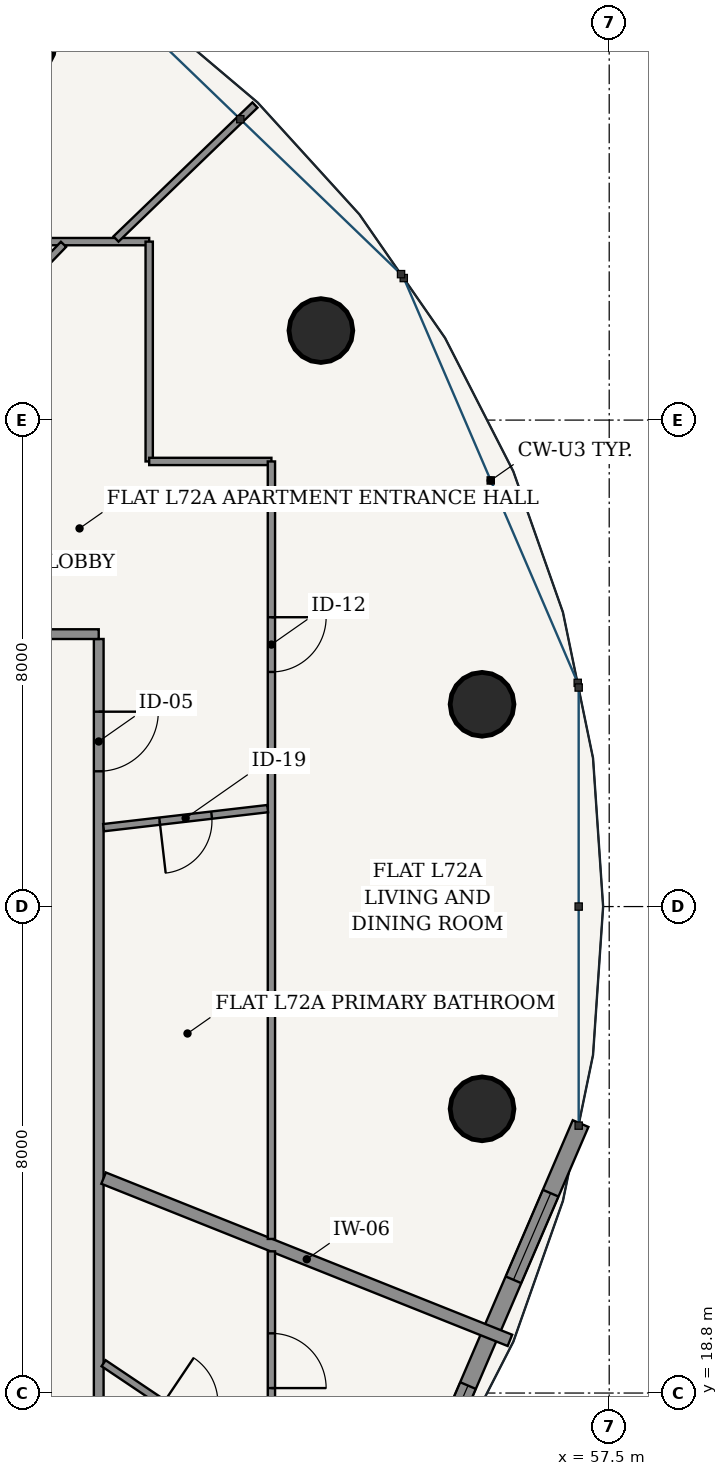
"""IFC4 building model, lengths in metres.
Left out: names, types, materials, properties, quantities, classifications, styles, units other than length and angle.
Written with IfcOpenShell. Run it as: python <this file> out.ifc"""

import sys

from ifc_helpers import new_model, si_unit, direction, frame, frame_2d, origin, origin_2d, place, context, subcontext, project, spatial, rectangle, hollow_circle, extrude, source, transform, mapped, element, fill, save


model = new_model("IFC4")
c1 = context("Model", 3, precision=1e-05, world=origin(), true_north=direction((-0.2419218956, 0.970295726276)))
c2 = subcontext(c1, "Body", "Model", "MODEL_VIEW")
j1 = project(units=[si_unit("LENGTHUNIT", "METRE"), si_unit("PLANEANGLEUNIT", "RADIAN")], contexts=[c1])
p1 = place(None, origin())
s1 = spatial("IfcSite", under=j1, at=p1, CompositionType="ELEMENT")
p2 = place(p1, origin())
s2 = spatial("IfcBuilding", under=s1, at=p2, CompositionType="ELEMENT")
p3 = place(p2, frame((0.0, 0.0, 274.45)))
s3 = spatial("IfcBuildingStorey", under=s2, at=p3, CompositionType="ELEMENT", Elevation=274.45)
for number, where, z_axis, x_axis in (
    (1, (55.409, 30.126, 0.0), (0.0, 0.0, 1.0), (1.0, 0.0, 0.0)),
    (2, (52.759, 36.272, 0.0), (0.0, 0.0, 1.0), (1.0, 0.0, 0.0)),
    (3, (47.861, 40.977, 0.0), (0.0, 0.0, 1.0), (1.0, 0.0, 0.0)),
    (4, (55.409, 23.474, 0.0), (0.0, 0.0, 1.0), (1.0, 0.0, 0.0)),
):
    element("IfcColumn", number, at=place(p3, frame(where, z_axis=z_axis, x_axis=x_axis)), inside=s3, PredefinedType="COLUMN", context=c2, shape_type="SweptSolid", body=[
        extrude(hollow_circle(Radius=0.525, WallThickness=0.035, at=origin_2d()), origin(), (0.0, 0.0, 1.0), 3.75),
    ])
p4 = place(p3, frame((54.074, 16.354, 0.0), z_axis=(0.0, 0.0, 1.0), x_axis=(0.394816612978, 0.918759948037, 0.0)))
e5 = element("IfcWall", 5, at=p4, inside=s3, PredefinedType="SOLIDWALL", context=c2, shape_type="SweptSolid", body=[
    extrude(rectangle(XDim=7.485, YDim=0.28, at=frame_2d((3.743, 0.0))), origin(), (0.0, 0.0, 1.0), 3.49),
])
p5 = place(p4, frame((1.246, 0.0, 0.85)))
e6 = element("IfcOpeningElement", 6, at=p5, cuts=e5, PredefinedType="OPENING", context=c2, shape_type="SweptSolid", body=[
    extrude(rectangle(XDim=1.55, YDim=1.95, at=frame_2d((0.775, 0.975))), frame((0.0, 0.15, 0.0), z_axis=(0.0, -1.0, 0.0), x_axis=(1.0, 0.0, 0.0)), (0.0, 0.0, 1.0), 0.3),
])
p6 = place(p4, frame((4.689, 0.0, 0.85)))
e7 = element("IfcOpeningElement", 7, at=p6, cuts=e5, PredefinedType="OPENING", context=c2, shape_type="SweptSolid", body=[
    extrude(rectangle(XDim=1.55, YDim=1.95, at=frame_2d((0.775, 0.975))), frame((0.0, 0.15, 0.0), z_axis=(0.0, -1.0, 0.0), x_axis=(1.0, 0.0, 0.0)), (0.0, 0.0, 1.0), 0.3),
])
p7 = place(p3, frame((49.105, 17.275, 0.0), z_axis=(0.0, 0.0, 1.0), x_axis=(0.0, 1.0, 0.0)))
e8 = element("IfcWall", 8, at=p7, inside=s3, PredefinedType="PARTITIONING", context=c2, shape_type="SweptSolid", body=[
    extrude(rectangle(XDim=13.925, YDim=0.16, at=frame_2d((6.962, 0.0))), origin(), (0.0, 0.0, 1.0), 3.015),
])
p8 = place(p7, frame((11.75, 0.0, 0.0)))
e9 = element("IfcOpeningElement", 9, at=p8, cuts=e8, PredefinedType="OPENING", context=c2, shape_type="SweptSolid", body=[
    extrude(rectangle(XDim=0.98, YDim=2.2, at=frame_2d((0.49, 1.1))), frame((0.0, 0.09, 0.0), z_axis=(0.0, -1.0, 0.0), x_axis=(1.0, 0.0, 0.0)), (0.0, 0.0, 1.0), 0.18),
])
p9 = place(p3, frame((47.175, 31.28, 0.0), z_axis=(0.0, 0.0, 1.0), x_axis=(1.0, 0.0, 0.0)))
e10 = element("IfcWall", 10, at=p9, inside=s3, PredefinedType="PARTITIONING", context=c2, shape_type="SweptSolid", body=[
    extrude(rectangle(XDim=1.93, YDim=0.16, at=frame_2d((0.965, 0.0))), origin(), (0.0, 0.0, 1.0), 3.49),
])
p10 = place(p3, frame((49.185, 22.334, 0.0), z_axis=(0.0, 0.0, 1.0), x_axis=(0.928710518269, -0.370805573389, 0.0)))
e11 = element("IfcWall", 11, at=p10, inside=s3, PredefinedType="PARTITIONING", context=c2, shape_type="SweptSolid", body=[
    extrude(rectangle(XDim=7.195, YDim=0.2, at=frame_2d((3.598, 0.0))), origin(), (0.0, 0.0, 1.0), 3.121),
])
p11 = place(p3, frame((26.065, 37.735, 0.0), z_axis=(0.0, 0.0, 1.0), x_axis=(1.0, 0.0, 0.0)))
e12 = element("IfcWall", 12, at=p11, inside=s3, PredefinedType="PARTITIONING", context=c2, shape_type="SweptSolid", body=[
    extrude(rectangle(XDim=23.87, YDim=0.12, at=frame_2d((11.935, 0.0))), origin(), (0.0, 0.0, 1.0), 3.015),
])
p12 = place(p11, frame((18.46, 0.0, 0.0)))
e13 = element("IfcOpeningElement", 13, at=p12, cuts=e12, PredefinedType="OPENING", context=c2, shape_type="SweptSolid", body=[
    extrude(rectangle(XDim=0.9, YDim=2.15, at=frame_2d((0.45, 1.075))), frame((0.0, 0.07, 0.0), z_axis=(0.0, -1.0, 0.0), x_axis=(1.0, 0.0, 0.0)), (0.0, 0.0, 1.0), 0.14),
])
p13 = place(p11, frame((3.144, 0.0, 0.0)))
e14 = element("IfcOpeningElement", 14, at=p13, cuts=e12, PredefinedType="OPENING", context=c2, shape_type="SweptSolid", body=[
    extrude(rectangle(XDim=0.9, YDim=2.15, at=frame_2d((0.45, 1.075))), frame((0.0, 0.07, 0.0), z_axis=(0.0, -1.0, 0.0), x_axis=(1.0, 0.0, 0.0)), (0.0, 0.0, 1.0), 0.14),
])
p14 = place(p3, frame((49.935, 37.735, 0.0), z_axis=(0.0, 0.0, 1.0), x_axis=(0.0, -1.0, 0.0)))
e15 = element("IfcWall", 15, at=p14, inside=s3, PredefinedType="PARTITIONING", context=c2, shape_type="SweptSolid", body=[
    extrude(rectangle(XDim=3.615, YDim=0.12, at=frame_2d((1.808, 0.0))), origin(), (0.0, 0.0, 1.0), 3.015),
])
p15 = place(p3, frame((49.935, 34.12, 0.0), z_axis=(0.0, 0.0, 1.0), x_axis=(1.0, 0.0, 0.0)))
e16 = element("IfcWall", 16, at=p15, inside=s3, PredefinedType="PARTITIONING", context=c2, shape_type="SweptSolid", body=[
    extrude(rectangle(XDim=2.01, YDim=0.12, at=frame_2d((1.005, 0.0))), origin(), (0.0, 0.0, 1.0), 3.209),
])
p16 = place(p3, frame((51.945, 34.12, 0.0), z_axis=(0.0, 0.0, 1.0), x_axis=(0.0, -1.0, 0.0)))
e17 = element("IfcWall", 17, at=p16, inside=s3, PredefinedType="PARTITIONING", context=c2, shape_type="SweptSolid", body=[
    extrude(rectangle(XDim=12.786, YDim=0.12, at=frame_2d((6.393, 0.0))), origin(), (0.0, 0.0, 1.0), 3.015),
])
p17 = place(p16, frame((2.562, 0.0, 0.0)))
e18 = element("IfcOpeningElement", 18, at=p17, cuts=e17, PredefinedType="OPENING", context=c2, shape_type="SweptSolid", body=[
    extrude(rectangle(XDim=0.9, YDim=2.15, at=frame_2d((0.45, 1.075))), frame((0.0, 0.07, 0.0), z_axis=(0.0, -1.0, 0.0), x_axis=(1.0, 0.0, 0.0)), (0.0, 0.0, 1.0), 0.14),
])
p18 = place(p3, frame((49.389, 37.778, 0.0), z_axis=(0.0, 0.0, 1.0), x_axis=(0.719985652574, 0.693988948102, 0.0)))
e19 = element("IfcWall", 19, at=p18, inside=s3, PredefinedType="PARTITIONING", context=c2, shape_type="SweptSolid", body=[
    extrude(rectangle(XDim=3.174, YDim=0.12, at=frame_2d((1.587, 0.0))), origin(), (0.0, 0.0, 1.0), 3.121),
])
p19 = place(p3, frame((49.185, 28.098, 0.0), z_axis=(0.0, 0.0, 1.0), x_axis=(0.993339475655, 0.115224503057, 0.0)))
e20 = element("IfcWall", 20, at=p19, inside=s3, PredefinedType="PARTITIONING", context=c2, shape_type="SweptSolid", body=[
    extrude(rectangle(XDim=2.716, YDim=0.12, at=frame_2d((1.358, 0.0))), origin(), (0.0, 0.0, 1.0), 3.209),
])
p20 = place(p19, frame((0.928, 0.0, 0.0)))
e21 = element("IfcOpeningElement", 21, at=p20, cuts=e20, PredefinedType="OPENING", context=c2, shape_type="SweptSolid", body=[
    extrude(rectangle(XDim=0.86, YDim=2.15, at=frame_2d((0.43, 1.075))), frame((0.0, 0.07, 0.0), z_axis=(0.0, -1.0, 0.0), x_axis=(1.0, 0.0, 0.0)), (0.0, 0.0, 1.0), 0.14),
])
p21 = place(p3, frame((45.903, 34.976, 0.0), z_axis=(0.0, 0.0, 1.0), x_axis=(0.69497417129, 0.719034700999, 0.0)))
e22 = element("IfcWall", 22, at=p21, inside=s3, PredefinedType="PARTITIONING", context=c2, shape_type="SweptSolid", body=[
    extrude(rectangle(XDim=3.775, YDim=0.12, at=frame_2d((1.887, 0.0))), origin(), (0.0, 0.0, 1.0), 3.015),
])
p22 = place(p21, frame((1.437, 0.0, 0.0)))
e23 = element("IfcOpeningElement", 23, at=p22, cuts=e22, PredefinedType="OPENING", context=c2, shape_type="SweptSolid", body=[
    extrude(rectangle(XDim=0.9, YDim=2.15, at=frame_2d((0.45, 1.075))), frame((0.0, 0.07, 0.0), z_axis=(0.0, -1.0, 0.0), x_axis=(1.0, 0.0, 0.0)), (0.0, 0.0, 1.0), 0.14),
])
p23 = place(p3, frame((51.945, 21.13, 0.0), z_axis=(0.0, 0.0, 1.0), x_axis=(0.0, -1.0, 0.0)))
e24 = element("IfcWall", 24, at=p23, inside=s3, PredefinedType="PARTITIONING", context=c2, shape_type="SweptSolid", body=[
    extrude(rectangle(XDim=6.775, YDim=0.12, at=frame_2d((3.388, 0.0))), origin(), (0.0, 0.0, 1.0), 3.015),
])
p24 = place(p23, frame((1.349, 0.0, 0.0)))
e25 = element("IfcOpeningElement", 25, at=p24, cuts=e24, PredefinedType="OPENING", context=c2, shape_type="SweptSolid", body=[
    extrude(rectangle(XDim=0.9, YDim=2.15, at=frame_2d((0.45, 1.075))), frame((0.0, 0.07, 0.0), z_axis=(0.0, -1.0, 0.0), x_axis=(1.0, 0.0, 0.0)), (0.0, 0.0, 1.0), 0.14),
])
p25 = place(p3, frame((49.185, 19.29, 0.0), z_axis=(0.0, 0.0, 1.0), x_axis=(0.830215193761, -0.557443030316, 0.0)))
e26 = element("IfcWall", 26, at=p25, inside=s3, PredefinedType="PARTITIONING", context=c2, shape_type="SweptSolid", body=[
    extrude(rectangle(XDim=3.262, YDim=0.12, at=frame_2d((1.631, 0.0))), origin(), (0.0, 0.0, 1.0), 3.209),
])
p26 = place(p25, frame((1.181, 0.0, 0.0)))
e27 = element("IfcOpeningElement", 27, at=p26, cuts=e26, PredefinedType="OPENING", context=c2, shape_type="SweptSolid", body=[
    extrude(rectangle(XDim=0.9, YDim=2.15, at=frame_2d((0.45, 1.075))), frame((0.0, 0.07, 0.0), z_axis=(0.0, -1.0, 0.0), x_axis=(1.0, 0.0, 0.0)), (0.0, 0.0, 1.0), 0.14),
])
m1 = source(origin(), c2, "Body", "SweptSolid", [
    extrude(rectangle(XDim=1.55, YDim=1.95, at=frame_2d((0.775, 0.975))), frame((0.0, 0.03, 0.0), z_axis=(0.0, -1.0, 0.0), x_axis=(1.0, 0.0, 0.0)), (0.0, 0.0, 1.0), 0.06),
])
p27 = place(p5, origin())
e28 = element("IfcWindow", 28, at=p27, inside=s3, PartitioningType="SINGLE_PANEL", PredefinedType="WINDOW", context=c2, shape_type="MappedRepresentation", body=[
    mapped(m1, transform((0.0, 0.0, 0.0), scale=1.0)),
])
fill(e6, e28)
p28 = place(p6, origin())
e29 = element("IfcWindow", 29, at=p28, inside=s3, PartitioningType="SINGLE_PANEL", PredefinedType="WINDOW", context=c2, shape_type="MappedRepresentation", body=[
    mapped(m1, transform((0.0, 0.0, 0.0), scale=1.0)),
])
fill(e7, e29)
m2 = source(origin(), c2, "Body", "SweptSolid", [
    extrude(rectangle(XDim=0.98, YDim=2.2, at=frame_2d((0.49, 1.1))), frame((0.0, 0.025, 0.0), z_axis=(0.0, -1.0, 0.0), x_axis=(1.0, 0.0, 0.0)), (0.0, 0.0, 1.0), 0.05),
])
p29 = place(p8, frame((0.98, 0.0, 0.0), z_axis=(0.0, 0.0, 1.0), x_axis=(-1.0, 0.0, 0.0)))
e30 = element("IfcDoor", 30, at=p29, inside=s3, OperationType="SINGLE_SWING_LEFT", PredefinedType="DOOR", context=c2, shape_type="MappedRepresentation", body=[
    mapped(m2, transform((0.0, 0.0, 0.0), scale=1.0)),
])
fill(e9, e30)
m3 = source(origin(), c2, "Body", "SweptSolid", [
    extrude(rectangle(XDim=0.86, YDim=2.15, at=frame_2d((0.43, 1.075))), frame((0.0, 0.025, 0.0), z_axis=(0.0, -1.0, 0.0), x_axis=(1.0, 0.0, 0.0)), (0.0, 0.0, 1.0), 0.05),
])
p30 = place(p20, frame((0.86, 0.0, 0.0), z_axis=(0.0, 0.0, 1.0), x_axis=(-1.0, 0.0, 0.0)))
e31 = element("IfcDoor", 31, at=p30, inside=s3, OperationType="SINGLE_SWING_RIGHT", PredefinedType="DOOR", context=c2, shape_type="MappedRepresentation", body=[
    mapped(m3, transform((0.0, 0.0, 0.0), scale=1.0)),
])
fill(e21, e31)
m4 = source(origin(), c2, "Body", "SweptSolid", [
    extrude(rectangle(XDim=0.9, YDim=2.15, at=frame_2d((0.45, 1.075))), frame((0.0, 0.025, 0.0), z_axis=(0.0, -1.0, 0.0), x_axis=(1.0, 0.0, 0.0)), (0.0, 0.0, 1.0), 0.05),
])
p31 = place(p17, origin())
e32 = element("IfcDoor", 32, at=p31, inside=s3, OperationType="SINGLE_SWING_LEFT", PredefinedType="DOOR", context=c2, shape_type="MappedRepresentation", body=[
    mapped(m4, transform((0.0, 0.0, 0.0), scale=1.0)),
])
fill(e18, e32)
p32 = place(p24, origin())
e33 = element("IfcDoor", 33, at=p32, inside=s3, OperationType="SINGLE_SWING_RIGHT", PredefinedType="DOOR", context=c2, shape_type="MappedRepresentation", body=[
    mapped(m4, transform((0.0, 0.0, 0.0), scale=1.0)),
])
fill(e25, e33)
save(model, sys.argv[1])
